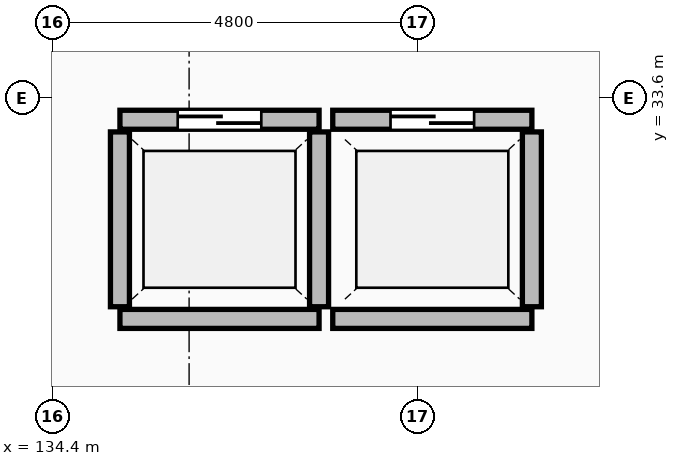
"""IFC4 building model, lengths in metres.
Left out: names, types, materials, properties, quantities, classifications, styles, units other than length and angle.
Written with IfcOpenShell. Run it as: python <this file> out.ifc"""

import sys

from ifc_helpers import new_model, si_unit, direction, frame, frame_2d, origin, place, context, subcontext, project, spatial, rectangle, extrude, element, fill, save


model = new_model("IFC4")
c1 = context("Model", 3, precision=1e-05, world=origin(), true_north=direction((0.0, 1.0)))
c2 = subcontext(c1, "Body", "Model", "MODEL_VIEW")
j1 = project(units=[si_unit("LENGTHUNIT", "METRE"), si_unit("PLANEANGLEUNIT", "RADIAN")], contexts=[c1])
p1 = place(None, origin())
s1 = spatial("IfcSite", under=j1, at=p1, CompositionType="ELEMENT")
p2 = place(p1, origin())
s2 = spatial("IfcBuilding", under=s1, at=p2, CompositionType="ELEMENT")
p3 = place(p2, frame((0.0, 0.0, -8.4)))
s3 = spatial("IfcBuildingStorey", under=s2, at=p3, CompositionType="ELEMENT", Elevation=-8.4)
p4 = place(p3, frame((135.29, 30.69, 0.0), z_axis=(0.0, 0.0, 1.0), x_axis=(1.0, 0.0, 0.0)))
e1 = element("IfcWall", 1, at=p4, inside=s3, PredefinedType="SOLIDWALL", context=c2, shape_type="SweptSolid", body=[
    extrude(rectangle(XDim=2.62, YDim=0.25, at=frame_2d((1.31, 0.0))), origin(), (0.0, 0.0, 1.0), 3.86),
])
p5 = place(p3, frame((135.29, 33.31, 0.0), z_axis=(0.0, 0.0, 1.0), x_axis=(1.0, 0.0, 0.0)))
e2 = element("IfcWall", 2, at=p5, inside=s3, PredefinedType="SOLIDWALL", context=c2, shape_type="SweptSolid", body=[
    extrude(rectangle(XDim=2.62, YDim=0.25, at=frame_2d((1.31, 0.0))), origin(), (0.0, 0.0, 1.0), 3.86),
])
p6 = place(p5, frame((0.76, 0.0, 0.0)))
e3 = element("IfcOpeningElement", 3, at=p6, cuts=e2, PredefinedType="OPENING", context=c2, shape_type="SweptSolid", body=[
    extrude(rectangle(XDim=1.1, YDim=2.2, at=frame_2d((0.55, 1.1))), frame((0.0, 0.137, 0.0), z_axis=(0.0, -1.0, 0.0), x_axis=(1.0, 0.0, 0.0)), (0.0, 0.0, 1.0), 0.274),
])
for number, where, z_axis, x_axis in (
    (4, (135.29, 30.85, 0.0), (0.0, 0.0, 1.0), (0.0, 1.0, 0.0)),
    (5, (137.91, 30.85, 0.0), (0.0, 0.0, 1.0), (0.0, 1.0, 0.0)),
):
    element("IfcWall", number, at=place(p3, frame(where, z_axis=z_axis, x_axis=x_axis)), inside=s3, PredefinedType="SOLIDWALL", context=c2, shape_type="SweptSolid", body=[
        extrude(rectangle(XDim=2.3, YDim=0.25, at=frame_2d((1.15, 0.0))), origin(), (0.0, 0.0, 1.0), 3.86),
    ])
p7 = place(p3, frame((138.09, 30.69, 0.0), z_axis=(0.0, 0.0, 1.0), x_axis=(1.0, 0.0, 0.0)))
e6 = element("IfcWall", 6, at=p7, inside=s3, PredefinedType="SOLIDWALL", context=c2, shape_type="SweptSolid", body=[
    extrude(rectangle(XDim=2.62, YDim=0.25, at=frame_2d((1.31, 0.0))), origin(), (0.0, 0.0, 1.0), 3.86),
])
p8 = place(p3, frame((138.09, 33.31, 0.0), z_axis=(0.0, 0.0, 1.0), x_axis=(1.0, 0.0, 0.0)))
e7 = element("IfcWall", 7, at=p8, inside=s3, PredefinedType="SOLIDWALL", context=c2, shape_type="SweptSolid", body=[
    extrude(rectangle(XDim=2.62, YDim=0.25, at=frame_2d((1.31, 0.0))), origin(), (0.0, 0.0, 1.0), 3.86),
])
p9 = place(p8, frame((0.76, 0.0, 0.0)))
e8 = element("IfcOpeningElement", 8, at=p9, cuts=e7, PredefinedType="OPENING", context=c2, shape_type="SweptSolid", body=[
    extrude(rectangle(XDim=1.1, YDim=2.2, at=frame_2d((0.55, 1.1))), frame((0.0, 0.137, 0.0), z_axis=(0.0, -1.0, 0.0), x_axis=(1.0, 0.0, 0.0)), (0.0, 0.0, 1.0), 0.274),
])
p10 = place(p3, frame((140.71, 30.85, 0.0), z_axis=(0.0, 0.0, 1.0), x_axis=(0.0, 1.0, 0.0)))
e9 = element("IfcWall", 9, at=p10, inside=s3, PredefinedType="SOLIDWALL", context=c2, shape_type="SweptSolid", body=[
    extrude(rectangle(XDim=2.3, YDim=0.25, at=frame_2d((1.15, 0.0))), origin(), (0.0, 0.0, 1.0), 3.86),
])
p11 = place(p6, origin())
e10 = element("IfcDoor", 10, at=p11, inside=s3, OperationType="SLIDING_TO_LEFT", PredefinedType="DOOR", context=c2, shape_type="SweptSolid", body=[
    extrude(rectangle(XDim=1.1, YDim=2.2, at=frame_2d((0.55, 1.1))), frame((0.0, 0.025, 0.0), z_axis=(0.0, -1.0, 0.0), x_axis=(1.0, 0.0, 0.0)), (0.0, 0.0, 1.0), 0.05),
])
fill(e3, e10)
p12 = place(p9, origin())
e11 = element("IfcDoor", 11, at=p12, inside=s3, OperationType="SLIDING_TO_LEFT", PredefinedType="DOOR", context=c2, shape_type="SweptSolid", body=[
    extrude(rectangle(XDim=1.1, YDim=2.2, at=frame_2d((0.55, 1.1))), frame((0.0, 0.025, 0.0), z_axis=(0.0, -1.0, 0.0), x_axis=(1.0, 0.0, 0.0)), (0.0, 0.0, 1.0), 0.05),
])
fill(e8, e11)
save(model, sys.argv[1])
